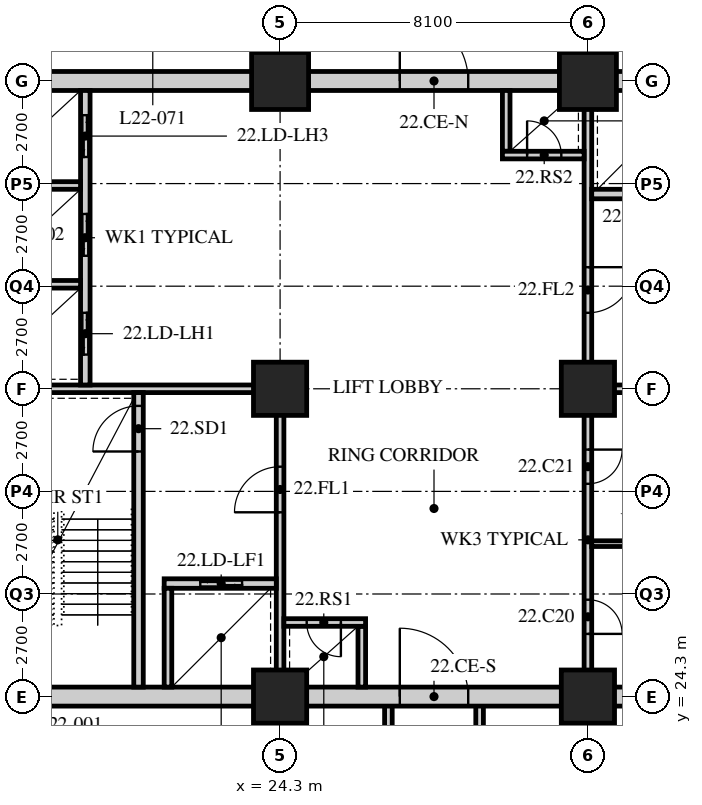
"""IFC4 building model, lengths in metres.
Left out: names, types, materials, properties, quantities, classifications, styles, units other than length and angle.
Written with IfcOpenShell. Run it as: python <this file> out.ifc"""

import sys

from ifc_helpers import new_model, si_unit, direction, frame, frame_2d, origin, origin_2d, place, context, subcontext, project, spatial, rectangle, hollow_rectangle, extrude, element, fill, save


model = new_model("IFC4")
c1 = context("Model", 3, precision=1e-05, world=origin(), true_north=direction((0.0, 1.0)))
c2 = subcontext(c1, "Body", "Model", "MODEL_VIEW")
j1 = project(units=[si_unit("LENGTHUNIT", "METRE"), si_unit("PLANEANGLEUNIT", "RADIAN")], contexts=[c1])
p1 = place(None, origin())
s1 = spatial("IfcSite", under=j1, at=p1, CompositionType="ELEMENT")
p2 = place(p1, origin())
s2 = spatial("IfcBuilding", under=s1, at=p2, CompositionType="ELEMENT")
p3 = place(p2, frame((0.0, 0.0, 87.4)))
s3 = spatial("IfcBuildingStorey", under=s2, at=p3, CompositionType="ELEMENT", Elevation=87.4)
for number, where, z_axis, x_axis in (
    (1, (24.3, 24.3, 0.0), (0.0, 0.0, 1.0), (1.0, 0.0, 0.0)),
    (2, (24.3, 32.4, 0.0), (0.0, 0.0, 1.0), (1.0, 0.0, 0.0)),
):
    element("IfcColumn", number, at=place(p3, frame(where, z_axis=z_axis, x_axis=x_axis)), inside=s3, PredefinedType="COLUMN", context=c2, shape_type="SweptSolid", body=[
        extrude(hollow_rectangle(XDim=1.4, YDim=1.4, WallThickness=0.12, at=origin_2d()), origin(), (0.0, 0.0, 1.0), 3.4),
    ])
p4 = place(p3, frame((24.3, 40.5, 0.0), z_axis=(0.0, 0.0, 1.0), x_axis=(1.0, 0.0, 0.0)))
e3 = element("IfcColumn", 3, at=p4, inside=s3, PredefinedType="COLUMN", context=c2, shape_type="SweptSolid", body=[
    extrude(hollow_rectangle(XDim=1.5, YDim=1.5, WallThickness=0.13, at=origin_2d()), origin(), (0.0, 0.0, 1.0), 3.4),
])
for number, where, z_axis, x_axis in (
    (4, (32.4, 24.3, 0.0), (0.0, 0.0, 1.0), (1.0, 0.0, 0.0)),
    (5, (32.4, 32.4, 0.0), (0.0, 0.0, 1.0), (1.0, 0.0, 0.0)),
):
    element("IfcColumn", number, at=place(p3, frame(where, z_axis=z_axis, x_axis=x_axis)), inside=s3, PredefinedType="COLUMN", context=c2, shape_type="SweptSolid", body=[
        extrude(hollow_rectangle(XDim=1.4, YDim=1.4, WallThickness=0.12, at=origin_2d()), origin(), (0.0, 0.0, 1.0), 3.4),
    ])
p5 = place(p3, frame((32.4, 40.5, 0.0), z_axis=(0.0, 0.0, 1.0), x_axis=(1.0, 0.0, 0.0)))
e6 = element("IfcColumn", 6, at=p5, inside=s3, PredefinedType="COLUMN", context=c2, shape_type="SweptSolid", body=[
    extrude(hollow_rectangle(XDim=1.5, YDim=1.5, WallThickness=0.13, at=origin_2d()), origin(), (0.0, 0.0, 1.0), 3.4),
])
p6 = place(p3, frame((32.407, 18.0, 0.0), z_axis=(0.0, 0.0, 1.0), x_axis=(0.0, 1.0, 0.0)))
e7 = element("IfcWall", 7, at=p6, inside=s3, PredefinedType="SOLIDWALL", context=c2, shape_type="SweptSolid", body=[
    extrude(rectangle(XDim=6.3, YDim=0.2, at=frame_2d((3.15, 0.0))), origin(), (0.0, 0.0, 1.0), 2.05),
])
for number, where, z_axis, x_axis in (
    (8, (27.15, 18.0, 0.0), (0.0, 0.0, 1.0), (0.0, 1.0, 0.0)),
    (9, (29.55, 18.0, 0.0), (0.0, 0.0, 1.0), (0.0, 1.0, 0.0)),
):
    element("IfcWall", number, at=place(p3, frame(where, z_axis=z_axis, x_axis=x_axis)), inside=s3, PredefinedType="SOLIDWALL", context=c2, shape_type="SweptSolid", body=[
        extrude(rectangle(XDim=6.3, YDim=0.2, at=frame_2d((3.15, 0.0))), origin(), (0.0, 0.0, 1.0), 3.15),
    ])
p7 = place(p3, frame((15.95, 24.3, 0.0), z_axis=(0.0, 0.0, 1.0), x_axis=(1.0, 0.0, 0.0)))
e10 = element("IfcWall", 10, at=p7, inside=s3, PredefinedType="SOLIDWALL", context=c2, shape_type="SweptSolid", body=[
    extrude(rectangle(XDim=8.35, YDim=0.5, at=frame_2d((4.175, 0.0))), origin(), (0.0, 0.0, 1.0), 2.388),
])
p8 = place(p3, frame((24.3, 24.3, 0.0), z_axis=(0.0, 0.0, 1.0), x_axis=(1.0, 0.0, 0.0)))
e11 = element("IfcWall", 11, at=p8, inside=s3, PredefinedType="SOLIDWALL", context=c2, shape_type="SweptSolid", body=[
    extrude(rectangle(XDim=8.1, YDim=0.5, at=frame_2d((4.05, 0.0))), origin(), (0.0, 0.0, 1.0), 2.5),
])
p9 = place(p8, frame((3.15, 0.0, 0.0)))
e12 = element("IfcOpeningElement", 12, at=p9, cuts=e11, PredefinedType="OPENING", context=c2, shape_type="SweptSolid", body=[
    extrude(rectangle(XDim=1.8, YDim=2.4, at=frame_2d((0.9, 1.2))), frame((0.0, 0.26, 0.0), z_axis=(0.0, -1.0, 0.0), x_axis=(1.0, 0.0, 0.0)), (0.0, 0.0, 1.0), 0.52),
])
for number, where, z_axis, x_axis in (
    (13, (32.4, 24.3, 0.0), (0.0, 0.0, 1.0), (1.0, 0.0, 0.0)),
    (14, (15.95, 40.5, 0.0), (0.0, 0.0, 1.0), (1.0, 0.0, 0.0)),
):
    element("IfcWall", number, at=place(p3, frame(where, z_axis=z_axis, x_axis=x_axis)), inside=s3, PredefinedType="SOLIDWALL", context=c2, shape_type="SweptSolid", body=[
        extrude(rectangle(XDim=8.35, YDim=0.5, at=frame_2d((4.175, 0.0))), origin(), (0.0, 0.0, 1.0), 2.388),
    ])
p10 = place(p3, frame((24.3, 40.5, 0.0), z_axis=(0.0, 0.0, 1.0), x_axis=(1.0, 0.0, 0.0)))
e15 = element("IfcWall", 15, at=p10, inside=s3, PredefinedType="SOLIDWALL", context=c2, shape_type="SweptSolid", body=[
    extrude(rectangle(XDim=8.1, YDim=0.5, at=frame_2d((4.05, 0.0))), origin(), (0.0, 0.0, 1.0), 2.5),
])
p11 = place(p10, frame((3.15, 0.0, 0.0)))
e16 = element("IfcOpeningElement", 16, at=p11, cuts=e15, PredefinedType="OPENING", context=c2, shape_type="SweptSolid", body=[
    extrude(rectangle(XDim=1.8, YDim=2.4, at=frame_2d((0.9, 1.2))), frame((0.0, 0.26, 0.0), z_axis=(0.0, -1.0, 0.0), x_axis=(1.0, 0.0, 0.0)), (0.0, 0.0, 1.0), 0.52),
])
p12 = place(p3, frame((32.4, 40.5, 0.0), z_axis=(0.0, 0.0, 1.0), x_axis=(1.0, 0.0, 0.0)))
e17 = element("IfcWall", 17, at=p12, inside=s3, PredefinedType="SOLIDWALL", context=c2, shape_type="SweptSolid", body=[
    extrude(rectangle(XDim=8.35, YDim=0.5, at=frame_2d((4.175, 0.0))), origin(), (0.0, 0.0, 1.0), 2.388),
])
p13 = place(p3, frame((16.45, 32.4, 0.0), z_axis=(0.0, 0.0, 1.0), x_axis=(1.0, 0.0, 0.0)))
e18 = element("IfcWall", 18, at=p13, inside=s3, PredefinedType="SOLIDWALL", context=c2, shape_type="SweptSolid", body=[
    extrude(rectangle(XDim=7.95, YDim=0.2, at=frame_2d((3.975, 0.0))), origin(), (0.0, 0.0, 1.0), 2.388),
])
p14 = place(p3, frame((24.3, 24.55, 0.0), z_axis=(0.0, 0.0, 1.0), x_axis=(0.0, 1.0, 0.0)))
e19 = element("IfcWall", 19, at=p14, inside=s3, PredefinedType="SOLIDWALL", context=c2, shape_type="SweptSolid", body=[
    extrude(rectangle(XDim=7.75, YDim=0.2, at=frame_2d((3.875, 0.0))), origin(), (0.0, 0.0, 1.0), 2.388),
])
p15 = place(p14, frame((4.6, 0.0, 0.0)))
e20 = element("IfcOpeningElement", 20, at=p15, cuts=e19, PredefinedType="OPENING", context=c2, shape_type="SweptSolid", body=[
    extrude(rectangle(XDim=1.2, YDim=2.1, at=frame_2d((0.6, 1.05))), frame((0.0, 0.11, 0.0), z_axis=(0.0, -1.0, 0.0), x_axis=(1.0, 0.0, 0.0)), (0.0, 0.0, 1.0), 0.22),
])
p16 = place(p3, frame((20.575, 24.55, 0.0), z_axis=(0.0, 0.0, 1.0), x_axis=(0.0, 1.0, 0.0)))
e21 = element("IfcWall", 21, at=p16, inside=s3, PredefinedType="SOLIDWALL", context=c2, shape_type="SweptSolid", body=[
    extrude(rectangle(XDim=7.75, YDim=0.25, at=frame_2d((3.875, 0.0))), origin(), (0.0, 0.0, 1.0), 3.15),
])
p17 = place(p16, frame((6.2, 0.0, 0.0)))
e22 = element("IfcOpeningElement", 22, at=p17, cuts=e21, PredefinedType="OPENING", context=c2, shape_type="SweptSolid", body=[
    extrude(rectangle(XDim=1.2, YDim=2.1, at=frame_2d((0.6, 1.05))), frame((0.0, 0.135, 0.0), z_axis=(0.0, -1.0, 0.0), x_axis=(1.0, 0.0, 0.0)), (0.0, 0.0, 1.0), 0.27),
])
p18 = place(p3, frame((21.25, 27.275, 0.0), z_axis=(0.0, 0.0, 1.0), x_axis=(1.0, 0.0, 0.0)))
e23 = element("IfcWall", 23, at=p18, inside=s3, PredefinedType="SOLIDWALL", context=c2, shape_type="SweptSolid", body=[
    extrude(rectangle(XDim=2.95, YDim=0.25, at=frame_2d((1.475, 0.0))), origin(), (0.0, 0.0, 1.0), 3.15),
])
p19 = place(p18, frame((0.95, 0.0, 0.0)))
e24 = element("IfcOpeningElement", 24, at=p19, cuts=e23, PredefinedType="OPENING", context=c2, shape_type="SweptSolid", body=[
    extrude(rectangle(XDim=1.1, YDim=2.4, at=frame_2d((0.55, 1.2))), frame((0.0, 0.135, 0.0), z_axis=(0.0, -1.0, 0.0), x_axis=(1.0, 0.0, 0.0)), (0.0, 0.0, 1.0), 0.27),
])
p20 = place(p3, frame((21.35, 24.55, 0.0), z_axis=(0.0, 0.0, 1.0), x_axis=(0.0, 1.0, 0.0)))
e25 = element("IfcWall", 25, at=p20, inside=s3, PredefinedType="SOLIDWALL", context=c2, shape_type="SweptSolid", body=[
    extrude(rectangle(XDim=2.6, YDim=0.2, at=frame_2d((1.3, 0.0))), origin(), (0.0, 0.0, 1.0), 3.15),
])
p21 = place(p3, frame((19.175, 32.5, 0.0), z_axis=(0.0, 0.0, 1.0), x_axis=(0.0, 1.0, 0.0)))
e26 = element("IfcWall", 26, at=p21, inside=s3, PredefinedType="SOLIDWALL", context=c2, shape_type="SweptSolid", body=[
    extrude(rectangle(XDim=7.75, YDim=0.25, at=frame_2d((3.875, 0.0))), origin(), (0.0, 0.0, 1.0), 3.15),
])
p22 = place(p21, frame((0.8, 0.0, 0.0)))
e27 = element("IfcOpeningElement", 27, at=p22, cuts=e26, PredefinedType="OPENING", context=c2, shape_type="SweptSolid", body=[
    extrude(rectangle(XDim=1.1, YDim=2.4, at=frame_2d((0.55, 1.2))), frame((0.0, 0.135, 0.0), z_axis=(0.0, -1.0, 0.0), x_axis=(1.0, 0.0, 0.0)), (0.0, 0.0, 1.0), 0.27),
])
p23 = place(p21, frame((3.4, 0.0, 0.0)))
e28 = element("IfcOpeningElement", 28, at=p23, cuts=e26, PredefinedType="OPENING", context=c2, shape_type="SweptSolid", body=[
    extrude(rectangle(XDim=1.1, YDim=2.4, at=frame_2d((0.55, 1.2))), frame((0.0, 0.135, 0.0), z_axis=(0.0, -1.0, 0.0), x_axis=(1.0, 0.0, 0.0)), (0.0, 0.0, 1.0), 0.27),
])
p24 = place(p21, frame((6.0, 0.0, 0.0)))
e29 = element("IfcOpeningElement", 29, at=p24, cuts=e26, PredefinedType="OPENING", context=c2, shape_type="SweptSolid", body=[
    extrude(rectangle(XDim=1.1, YDim=2.4, at=frame_2d((0.55, 1.2))), frame((0.0, 0.135, 0.0), z_axis=(0.0, -1.0, 0.0), x_axis=(1.0, 0.0, 0.0)), (0.0, 0.0, 1.0), 0.27),
])
for number, where, z_axis, x_axis in (
    (30, (16.45, 35.15, 0.0), (0.0, 0.0, 1.0), (1.0, 0.0, 0.0)),
    (31, (16.45, 37.75, 0.0), (0.0, 0.0, 1.0), (1.0, 0.0, 0.0)),
):
    element("IfcWall", number, at=place(p3, frame(where, z_axis=z_axis, x_axis=x_axis)), inside=s3, PredefinedType="SOLIDWALL", context=c2, shape_type="SweptSolid", body=[
        extrude(rectangle(XDim=2.6, YDim=0.2, at=frame_2d((1.3, 0.0))), origin(), (0.0, 0.0, 1.0), 3.15),
    ])
p25 = place(p3, frame((26.45, 24.55, 0.0), z_axis=(0.0, 0.0, 1.0), x_axis=(0.0, 1.0, 0.0)))
e32 = element("IfcWall", 32, at=p25, inside=s3, PredefinedType="SOLIDWALL", context=c2, shape_type="SweptSolid", body=[
    extrude(rectangle(XDim=1.6, YDim=0.2, at=frame_2d((0.8, 0.0))), origin(), (0.0, 0.0, 1.0), 3.15),
])
p26 = place(p3, frame((24.4, 26.25, 0.0), z_axis=(0.0, 0.0, 1.0), x_axis=(1.0, 0.0, 0.0)))
e33 = element("IfcWall", 33, at=p26, inside=s3, PredefinedType="SOLIDWALL", context=c2, shape_type="SweptSolid", body=[
    extrude(rectangle(XDim=2.15, YDim=0.2, at=frame_2d((1.075, 0.0))), origin(), (0.0, 0.0, 1.0), 3.15),
])
p27 = place(p26, frame((0.6, 0.0, 0.0)))
e34 = element("IfcOpeningElement", 34, at=p27, cuts=e33, PredefinedType="OPENING", context=c2, shape_type="SweptSolid", body=[
    extrude(rectangle(XDim=0.9, YDim=2.1, at=frame_2d((0.45, 1.05))), frame((0.0, 0.11, 0.0), z_axis=(0.0, -1.0, 0.0), x_axis=(1.0, 0.0, 0.0)), (0.0, 0.0, 1.0), 0.22),
])
p28 = place(p3, frame((32.3, 32.4, 0.0), z_axis=(0.0, 0.0, 1.0), x_axis=(1.0, 0.0, 0.0)))
e35 = element("IfcWall", 35, at=p28, inside=s3, PredefinedType="SOLIDWALL", context=c2, shape_type="SweptSolid", body=[
    extrude(rectangle(XDim=7.95, YDim=0.2, at=frame_2d((3.975, 0.0))), origin(), (0.0, 0.0, 1.0), 2.388),
])
p29 = place(p3, frame((32.4, 32.5, 0.0), z_axis=(0.0, 0.0, 1.0), x_axis=(0.0, 1.0, 0.0)))
e36 = element("IfcWall", 36, at=p29, inside=s3, PredefinedType="SOLIDWALL", context=c2, shape_type="SweptSolid", body=[
    extrude(rectangle(XDim=7.75, YDim=0.2, at=frame_2d((3.875, 0.0))), origin(), (0.0, 0.0, 1.0), 2.388),
])
p30 = place(p29, frame((1.9, 0.0, 0.0)))
e37 = element("IfcOpeningElement", 37, at=p30, cuts=e36, PredefinedType="OPENING", context=c2, shape_type="SweptSolid", body=[
    extrude(rectangle(XDim=1.2, YDim=2.1, at=frame_2d((0.6, 1.05))), frame((0.0, 0.11, 0.0), z_axis=(0.0, -1.0, 0.0), x_axis=(1.0, 0.0, 0.0)), (0.0, 0.0, 1.0), 0.22),
])
p31 = place(p3, frame((32.5, 37.525, 0.0), z_axis=(0.0, 0.0, 1.0), x_axis=(1.0, 0.0, 0.0)))
e38 = element("IfcWall", 38, at=p31, inside=s3, PredefinedType="SOLIDWALL", context=c2, shape_type="SweptSolid", body=[
    extrude(rectangle(XDim=2.95, YDim=0.25, at=frame_2d((1.475, 0.0))), origin(), (0.0, 0.0, 1.0), 3.15),
])
p32 = place(p31, frame((0.9, 0.0, 0.0)))
e39 = element("IfcOpeningElement", 39, at=p32, cuts=e38, PredefinedType="OPENING", context=c2, shape_type="SweptSolid", body=[
    extrude(rectangle(XDim=1.1, YDim=2.4, at=frame_2d((0.55, 1.2))), frame((0.0, 0.135, 0.0), z_axis=(0.0, -1.0, 0.0), x_axis=(1.0, 0.0, 0.0)), (0.0, 0.0, 1.0), 0.27),
])
p33 = place(p3, frame((30.25, 38.65, 0.0), z_axis=(0.0, 0.0, 1.0), x_axis=(0.0, 1.0, 0.0)))
e40 = element("IfcWall", 40, at=p33, inside=s3, PredefinedType="SOLIDWALL", context=c2, shape_type="SweptSolid", body=[
    extrude(rectangle(XDim=1.6, YDim=0.2, at=frame_2d((0.8, 0.0))), origin(), (0.0, 0.0, 1.0), 3.15),
])
p34 = place(p3, frame((30.15, 38.55, 0.0), z_axis=(0.0, 0.0, 1.0), x_axis=(1.0, 0.0, 0.0)))
e41 = element("IfcWall", 41, at=p34, inside=s3, PredefinedType="SOLIDWALL", context=c2, shape_type="SweptSolid", body=[
    extrude(rectangle(XDim=2.15, YDim=0.2, at=frame_2d((1.075, 0.0))), origin(), (0.0, 0.0, 1.0), 3.15),
])
p35 = place(p34, frame((0.65, 0.0, 0.0)))
e42 = element("IfcOpeningElement", 42, at=p35, cuts=e41, PredefinedType="OPENING", context=c2, shape_type="SweptSolid", body=[
    extrude(rectangle(XDim=0.9, YDim=2.1, at=frame_2d((0.45, 1.05))), frame((0.0, 0.11, 0.0), z_axis=(0.0, -1.0, 0.0), x_axis=(1.0, 0.0, 0.0)), (0.0, 0.0, 1.0), 0.22),
])
p36 = place(p3, frame((32.4, 24.55, 0.0), z_axis=(0.0, 0.0, 1.0), x_axis=(0.0, 1.0, 0.0)))
e43 = element("IfcWall", 43, at=p36, inside=s3, PredefinedType="PARTITIONING", context=c2, shape_type="SweptSolid", body=[
    extrude(rectangle(XDim=7.75, YDim=0.2, at=frame_2d((3.875, 0.0))), origin(), (0.0, 0.0, 1.0), 2.388),
])
p37 = place(p36, frame((1.4, 0.0, 0.0)))
e44 = element("IfcOpeningElement", 44, at=p37, cuts=e43, PredefinedType="OPENING", context=c2, shape_type="SweptSolid", body=[
    extrude(rectangle(XDim=0.9, YDim=2.1, at=frame_2d((0.45, 1.05))), frame((0.0, 0.11, 0.0), z_axis=(0.0, -1.0, 0.0), x_axis=(1.0, 0.0, 0.0)), (0.0, 0.0, 1.0), 0.22),
])
p38 = place(p36, frame((5.35, 0.0, 0.0)))
e45 = element("IfcOpeningElement", 45, at=p38, cuts=e43, PredefinedType="OPENING", context=c2, shape_type="SweptSolid", body=[
    extrude(rectangle(XDim=0.9, YDim=2.1, at=frame_2d((0.45, 1.05))), frame((0.0, 0.11, 0.0), z_axis=(0.0, -1.0, 0.0), x_axis=(1.0, 0.0, 0.0)), (0.0, 0.0, 1.0), 0.22),
])
p39 = place(p3, frame((32.5, 28.325, 0.0), z_axis=(0.0, 0.0, 1.0), x_axis=(1.0, 0.0, 0.0)))
e46 = element("IfcWall", 46, at=p39, inside=s3, PredefinedType="PARTITIONING", context=c2, shape_type="SweptSolid", body=[
    extrude(rectangle(XDim=4.9, YDim=0.15, at=frame_2d((2.45, 0.0))), origin(), (0.0, 0.0, 1.0), 3.15),
])
p40 = place(p37, origin())
e47 = element("IfcDoor", 47, at=p40, inside=s3, OperationType="SINGLE_SWING_RIGHT", PredefinedType="DOOR", context=c2, shape_type="SweptSolid", body=[
    extrude(rectangle(XDim=0.9, YDim=2.1, at=frame_2d((0.45, 1.05))), frame((0.0, 0.025, 0.0), z_axis=(0.0, -1.0, 0.0), x_axis=(1.0, 0.0, 0.0)), (0.0, 0.0, 1.0), 0.05),
])
fill(e44, e47)
p41 = place(p38, origin())
e48 = element("IfcDoor", 48, at=p41, inside=s3, OperationType="SINGLE_SWING_LEFT", PredefinedType="DOOR", context=c2, shape_type="SweptSolid", body=[
    extrude(rectangle(XDim=0.9, YDim=2.1, at=frame_2d((0.45, 1.05))), frame((0.0, 0.025, 0.0), z_axis=(0.0, -1.0, 0.0), x_axis=(1.0, 0.0, 0.0)), (0.0, 0.0, 1.0), 0.05),
])
fill(e45, e48)
p42 = place(p17, origin())
e49 = element("IfcDoor", 49, at=p42, inside=s3, OperationType="SINGLE_SWING_LEFT", PredefinedType="DOOR", context=c2, shape_type="SweptSolid", body=[
    extrude(rectangle(XDim=1.2, YDim=2.1, at=frame_2d((0.6, 1.05))), frame((0.0, 0.025, 0.0), z_axis=(0.0, -1.0, 0.0), x_axis=(1.0, 0.0, 0.0)), (0.0, 0.0, 1.0), 0.05),
])
fill(e22, e49)
p43 = place(p15, origin())
e50 = element("IfcDoor", 50, at=p43, inside=s3, OperationType="SINGLE_SWING_LEFT", PredefinedType="DOOR", context=c2, shape_type="SweptSolid", body=[
    extrude(rectangle(XDim=1.2, YDim=2.1, at=frame_2d((0.6, 1.05))), frame((0.0, 0.025, 0.0), z_axis=(0.0, -1.0, 0.0), x_axis=(1.0, 0.0, 0.0)), (0.0, 0.0, 1.0), 0.05),
])
fill(e20, e50)
p44 = place(p27, origin())
e51 = element("IfcDoor", 51, at=p44, inside=s3, OperationType="SINGLE_SWING_LEFT", PredefinedType="DOOR", context=c2, shape_type="SweptSolid", body=[
    extrude(rectangle(XDim=0.9, YDim=2.1, at=frame_2d((0.45, 1.05))), frame((0.0, 0.025, 0.0), z_axis=(0.0, -1.0, 0.0), x_axis=(1.0, 0.0, 0.0)), (0.0, 0.0, 1.0), 0.05),
])
fill(e34, e51)
p45 = place(p30, origin())
e52 = element("IfcDoor", 52, at=p45, inside=s3, OperationType="SINGLE_SWING_LEFT", PredefinedType="DOOR", context=c2, shape_type="SweptSolid", body=[
    extrude(rectangle(XDim=1.2, YDim=2.1, at=frame_2d((0.6, 1.05))), frame((0.0, 0.025, 0.0), z_axis=(0.0, -1.0, 0.0), x_axis=(1.0, 0.0, 0.0)), (0.0, 0.0, 1.0), 0.05),
])
fill(e37, e52)
p46 = place(p35, origin())
e53 = element("IfcDoor", 53, at=p46, inside=s3, OperationType="SINGLE_SWING_LEFT", PredefinedType="DOOR", context=c2, shape_type="SweptSolid", body=[
    extrude(rectangle(XDim=0.9, YDim=2.1, at=frame_2d((0.45, 1.05))), frame((0.0, 0.025, 0.0), z_axis=(0.0, -1.0, 0.0), x_axis=(1.0, 0.0, 0.0)), (0.0, 0.0, 1.0), 0.05),
])
fill(e42, e53)
p47 = place(p22, origin())
e54 = element("IfcDoor", 54, at=p47, inside=s3, OperationType="DOUBLE_DOOR_SLIDING", PredefinedType="DOOR", context=c2, shape_type="SweptSolid", body=[
    extrude(rectangle(XDim=1.1, YDim=2.4, at=frame_2d((0.55, 1.2))), frame((0.0, 0.025, 0.0), z_axis=(0.0, -1.0, 0.0), x_axis=(1.0, 0.0, 0.0)), (0.0, 0.0, 1.0), 0.05),
])
fill(e27, e54)
p48 = place(p23, origin())
e55 = element("IfcDoor", 55, at=p48, inside=s3, OperationType="DOUBLE_DOOR_SLIDING", PredefinedType="DOOR", context=c2, shape_type="SweptSolid", body=[
    extrude(rectangle(XDim=1.1, YDim=2.4, at=frame_2d((0.55, 1.2))), frame((0.0, 0.025, 0.0), z_axis=(0.0, -1.0, 0.0), x_axis=(1.0, 0.0, 0.0)), (0.0, 0.0, 1.0), 0.05),
])
fill(e28, e55)
p49 = place(p24, origin())
e56 = element("IfcDoor", 56, at=p49, inside=s3, OperationType="DOUBLE_DOOR_SLIDING", PredefinedType="DOOR", context=c2, shape_type="SweptSolid", body=[
    extrude(rectangle(XDim=1.1, YDim=2.4, at=frame_2d((0.55, 1.2))), frame((0.0, 0.025, 0.0), z_axis=(0.0, -1.0, 0.0), x_axis=(1.0, 0.0, 0.0)), (0.0, 0.0, 1.0), 0.05),
])
fill(e29, e56)
p50 = place(p19, origin())
e57 = element("IfcDoor", 57, at=p50, inside=s3, OperationType="DOUBLE_DOOR_SLIDING", PredefinedType="DOOR", context=c2, shape_type="SweptSolid", body=[
    extrude(rectangle(XDim=1.1, YDim=2.4, at=frame_2d((0.55, 1.2))), frame((0.0, 0.025, 0.0), z_axis=(0.0, -1.0, 0.0), x_axis=(1.0, 0.0, 0.0)), (0.0, 0.0, 1.0), 0.05),
])
fill(e24, e57)
p51 = place(p9, origin())
e58 = element("IfcDoor", 58, at=p51, inside=s3, OperationType="DOUBLE_DOOR_SINGLE_SWING", PredefinedType="DOOR", context=c2, shape_type="SweptSolid", body=[
    extrude(rectangle(XDim=1.8, YDim=2.4, at=frame_2d((0.9, 1.2))), frame((0.0, 0.025, 0.0), z_axis=(0.0, -1.0, 0.0), x_axis=(1.0, 0.0, 0.0)), (0.0, 0.0, 1.0), 0.05),
])
fill(e12, e58)
p52 = place(p11, origin())
e59 = element("IfcDoor", 59, at=p52, inside=s3, OperationType="DOUBLE_DOOR_SINGLE_SWING", PredefinedType="DOOR", context=c2, shape_type="SweptSolid", body=[
    extrude(rectangle(XDim=1.8, YDim=2.4, at=frame_2d((0.9, 1.2))), frame((0.0, 0.025, 0.0), z_axis=(0.0, -1.0, 0.0), x_axis=(1.0, 0.0, 0.0)), (0.0, 0.0, 1.0), 0.05),
])
fill(e16, e59)
save(model, sys.argv[1])
